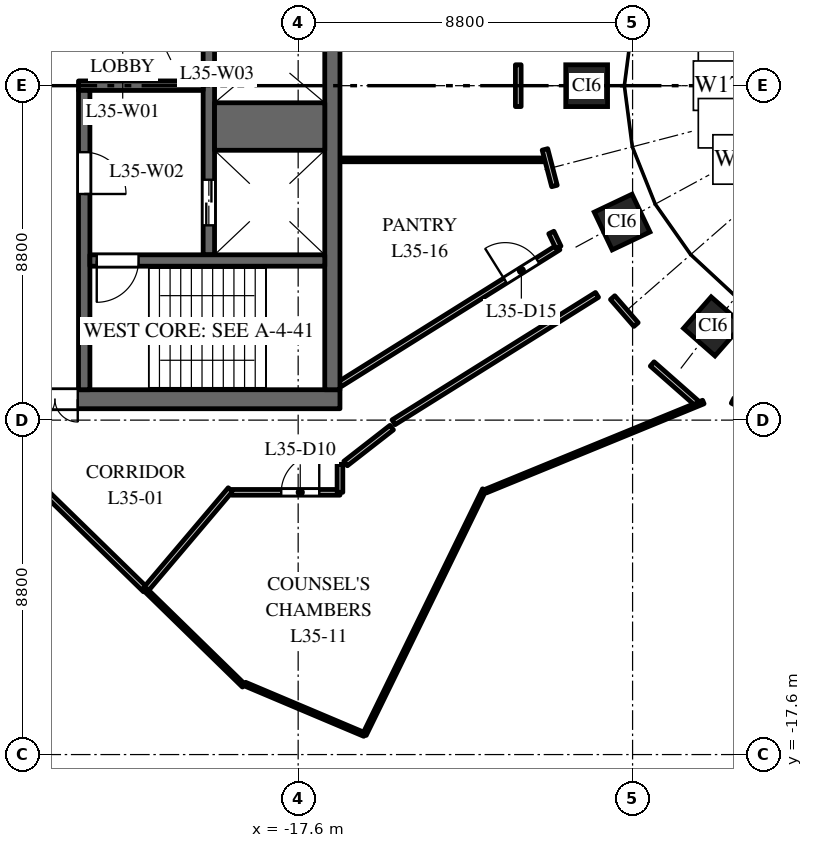
"""IFC4 building model, lengths in metres.
Left out: names, types, materials, properties, quantities, classifications, styles, units other than length and angle.
Written with IfcOpenShell. Run it as: python <this file> out.ifc"""

import sys

from ifc_helpers import new_model, si_unit, direction, frame, frame_2d, origin, origin_2d, place, context, subcontext, project, spatial, rectangle, extrude, element, fill, save


model = new_model("IFC4")
c1 = context("Model", 3, precision=1e-05, world=origin(), true_north=direction((0.0, 1.0)))
c2 = subcontext(c1, "Body", "Model", "MODEL_VIEW")
j1 = project(units=[si_unit("LENGTHUNIT", "METRE"), si_unit("PLANEANGLEUNIT", "RADIAN")], contexts=[c1])
p1 = place(None, origin())
s1 = spatial("IfcSite", under=j1, at=p1, CompositionType="ELEMENT")
p2 = place(p1, origin())
s2 = spatial("IfcBuilding", under=s1, at=p2, CompositionType="ELEMENT")
p3 = place(p2, frame((0.0, 0.0, 154.0)))
s3 = spatial("IfcBuildingStorey", under=s2, at=p3, CompositionType="ELEMENT", Elevation=154.0)
for number, where, z_axis, x_axis in (
    (1, (-10.008, 0.0, 0.0), (0.0, 0.0, 1.0), (0.0, -1.0, 0.0)),
    (2, (-9.076, -3.588, 0.0), (0.0, 0.0, 1.0), (0.429, -0.903, 0.0)),
    (3, (-6.682, -6.334, 0.0), (0.0, 0.0, 1.0), (0.751, -0.66, 0.0)),
):
    element("IfcColumn", number, at=place(p3, frame(where, z_axis=z_axis, x_axis=x_axis)), inside=s3, PredefinedType="COLUMN", context=c2, shape_type="SweptSolid", body=[
        extrude(rectangle(XDim=1.1, YDim=1.1, at=origin_2d()), origin(), (0.0, 0.0, 1.0), 4.0),
    ])
p4 = place(p3, frame((-16.5, -8.25, 0.0), z_axis=(0.0, 0.0, 1.0), x_axis=(-1.0, 0.0, 0.0)))
e4 = element("IfcWall", 4, at=p4, inside=s3, PredefinedType="SHEAR", context=c2, shape_type="SweptSolid", body=[
    extrude(rectangle(XDim=15.0, YDim=0.5, at=frame_2d((7.5, 0.0))), origin(), (0.0, 0.0, 1.0), 3.7),
])
p5 = place(p4, frame((6.9, 0.0, 0.0)))
e5 = element("IfcOpeningElement", 5, at=p5, cuts=e4, PredefinedType="OPENING", context=c2, shape_type="SweptSolid", body=[
    extrude(rectangle(XDim=1.2, YDim=2.1, at=frame_2d((0.6, 1.05))), frame((0.0, 0.26, 0.0), z_axis=(0.0, -1.0, 0.0), x_axis=(1.0, 0.0, 0.0)), (0.0, 0.0, 1.0), 0.52),
])
p6 = place(p4, frame((12.05, 0.0, 0.0)))
e6 = element("IfcOpeningElement", 6, at=p6, cuts=e4, PredefinedType="OPENING", context=c2, shape_type="SweptSolid", body=[
    extrude(rectangle(XDim=0.9, YDim=2.1, at=frame_2d((0.45, 1.05))), frame((0.0, 0.26, 0.0), z_axis=(0.0, -1.0, 0.0), x_axis=(1.0, 0.0, 0.0)), (0.0, 0.0, 1.0), 0.52),
])
p7 = place(p3, frame((-19.95, -4.45, 0.0), z_axis=(0.0, 0.0, 1.0), x_axis=(0.0, 1.0, 0.0)))
e7 = element("IfcWall", 7, at=p7, inside=s3, PredefinedType="SHEAR", context=c2, shape_type="SweptSolid", body=[
    extrude(rectangle(XDim=8.9, YDim=0.3, at=frame_2d((4.45, 0.0))), origin(), (0.0, 0.0, 1.0), 3.7),
])
p8 = place(p7, frame((0.775, 0.0, 0.0)))
e8 = element("IfcOpeningElement", 8, at=p8, cuts=e7, PredefinedType="OPENING", context=c2, shape_type="SweptSolid", body=[
    extrude(rectangle(XDim=1.2, YDim=2.1, at=frame_2d((0.6, 1.05))), frame((0.0, 0.16, 0.0), z_axis=(0.0, -1.0, 0.0), x_axis=(1.0, 0.0, 0.0)), (0.0, 0.0, 1.0), 0.32),
])
p9 = place(p7, frame((7.25, 0.0, 0.0)))
e9 = element("IfcOpeningElement", 9, at=p9, cuts=e7, PredefinedType="OPENING", context=c2, shape_type="SweptSolid", body=[
    extrude(rectangle(XDim=1.1, YDim=2.1, at=frame_2d((0.55, 1.05))), frame((0.0, 0.16, 0.0), z_axis=(0.0, -1.0, 0.0), x_axis=(1.0, 0.0, 0.0)), (0.0, 0.0, 1.0), 0.32),
])
p10 = place(p3, frame((-20.1, 0.0, 0.0), z_axis=(0.0, 0.0, 1.0), x_axis=(-1.0, 0.0, 0.0)))
e10 = element("IfcWall", 10, at=p10, inside=s3, PredefinedType="SHEAR", context=c2, shape_type="SweptSolid", body=[
    extrude(rectangle(XDim=3.28, YDim=0.25, at=frame_2d((1.64, 0.0))), origin(), (0.0, 0.0, 1.0), 3.7),
])
p11 = place(p3, frame((-16.7, -8.0, 0.0), z_axis=(0.0, 0.0, 1.0), x_axis=(0.0, 1.0, 0.0)))
e11 = element("IfcWall", 11, at=p11, inside=s3, PredefinedType="SHEAR", context=c2, shape_type="SweptSolid", body=[
    extrude(rectangle(XDim=16.0, YDim=0.4, at=frame_2d((8.0, 0.0))), origin(), (0.0, 0.0, 1.0), 3.7),
])
p12 = place(p3, frame((-16.9, -1.075, 0.0), z_axis=(0.0, 0.0, 1.0), x_axis=(-1.0, 0.0, 0.0)))
e12 = element("IfcWall", 12, at=p12, inside=s3, PredefinedType="SHEAR", context=c2, shape_type="SweptSolid", body=[
    extrude(rectangle(XDim=2.9, YDim=1.25, at=frame_2d((1.45, 0.0))), origin(), (0.0, 0.0, 1.0), 3.7),
])
p13 = place(p3, frame((-23.23, -8.0, 0.0), z_axis=(0.0, 0.0, 1.0), x_axis=(0.0, 1.0, 0.0)))
e13 = element("IfcWall", 13, at=p13, inside=s3, PredefinedType="SHEAR", context=c2, shape_type="SweptSolid", body=[
    extrude(rectangle(XDim=7.875, YDim=0.3, at=frame_2d((3.938, 0.0))), origin(), (0.0, 0.0, 1.0), 3.7),
])
p14 = place(p13, frame((5.15, 0.0, 0.0)))
e14 = element("IfcOpeningElement", 14, at=p14, cuts=e13, PredefinedType="OPENING", context=c2, shape_type="SweptSolid", body=[
    extrude(rectangle(XDim=1.1, YDim=2.1, at=frame_2d((0.55, 1.05))), frame((0.0, 0.16, 0.0), z_axis=(0.0, -1.0, 0.0), x_axis=(1.0, 0.0, 0.0)), (0.0, 0.0, 1.0), 0.32),
])
p15 = place(p3, frame((-16.9, -4.6, 0.0), z_axis=(0.0, 0.0, 1.0), x_axis=(-1.0, 0.0, 0.0)))
e15 = element("IfcWall", 15, at=p15, inside=s3, PredefinedType="SHEAR", context=c2, shape_type="SweptSolid", body=[
    extrude(rectangle(XDim=6.18, YDim=0.3, at=frame_2d((3.09, 0.0))), origin(), (0.0, 0.0, 1.0), 3.7),
])
p16 = place(p15, frame((4.9, 0.0, 0.0)))
e16 = element("IfcOpeningElement", 16, at=p16, cuts=e15, PredefinedType="OPENING", context=c2, shape_type="SweptSolid", body=[
    extrude(rectangle(XDim=1.1, YDim=2.1, at=frame_2d((0.55, 1.05))), frame((0.0, 0.16, 0.0), z_axis=(0.0, -1.0, 0.0), x_axis=(1.0, 0.0, 0.0)), (0.0, 0.0, 1.0), 0.32),
])
p17 = place(p3, frame((-24.166, -10.778, 0.0), z_axis=(0.0, 0.0, 1.0), x_axis=(0.715930732039, -0.698171316313, 0.0)))
e17 = element("IfcWall", 17, at=p17, inside=s3, PredefinedType="PARTITIONING", context=c2, shape_type="SweptSolid", body=[
    extrude(rectangle(XDim=3.561, YDim=0.15, at=frame_2d((1.78, 0.0))), origin(), (0.0, 0.0, 1.0), 3.7),
])
p18 = place(p3, frame((-21.617, -13.264, 0.0), z_axis=(0.0, 0.0, 1.0), x_axis=(0.646521695402, 0.762895600574, 0.0)))
e18 = element("IfcWall", 18, at=p18, inside=s3, PredefinedType="PARTITIONING", context=c2, shape_type="SweptSolid", body=[
    extrude(rectangle(XDim=3.455, YDim=0.15, at=frame_2d((1.728, 0.0))), origin(), (0.0, 0.0, 1.0), 3.7),
])
p19 = place(p3, frame((-21.617, -13.264, 0.0), z_axis=(0.0, 0.0, 1.0), x_axis=(0.715469649978, -0.698643814802, 0.0)))
e19 = element("IfcWall", 19, at=p19, inside=s3, PredefinedType="PARTITIONING", context=c2, shape_type="SweptSolid", body=[
    extrude(rectangle(XDim=3.613, YDim=0.1, at=frame_2d((1.807, 0.0))), origin(), (0.0, 0.0, 1.0), 2.75),
])
p20 = place(p3, frame((-19.347, -10.7, 0.0), z_axis=(0.0, 0.0, 1.0), x_axis=(1.0, 0.0, 0.0)))
e20 = element("IfcWall", 20, at=p20, inside=s3, PredefinedType="PARTITIONING", context=c2, shape_type="SweptSolid", body=[
    extrude(rectangle(XDim=2.847, YDim=0.15, at=frame_2d((1.423, 0.0))), origin(), (0.0, 0.0, 1.0), 3.7),
])
p21 = place(p20, frame((1.302, 0.0, 0.0)))
e21 = element("IfcOpeningElement", 21, at=p21, cuts=e20, PredefinedType="OPENING", context=c2, shape_type="SweptSolid", body=[
    extrude(rectangle(XDim=1.0, YDim=2.1, at=frame_2d((0.5, 1.05))), frame((0.0, 0.085, 0.0), z_axis=(0.0, -1.0, 0.0), x_axis=(1.0, 0.0, 0.0)), (0.0, 0.0, 1.0), 0.17),
])
p22 = place(p3, frame((-19.003, -15.744, 0.0), z_axis=(0.0, 0.0, 1.0), x_axis=(0.921193815687, -0.389104039995, 0.0)))
e22 = element("IfcWall", 22, at=p22, inside=s3, PredefinedType="PARTITIONING", context=c2, shape_type="SweptSolid", body=[
    extrude(rectangle(XDim=3.418, YDim=0.1, at=frame_2d((1.709, 0.0))), origin(), (0.0, 0.0, 1.0), 3.7),
])
p23 = place(p3, frame((-16.5, -10.7, 0.0), z_axis=(0.0, 0.0, 1.0), x_axis=(0.0, 1.0, 0.0)))
e23 = element("IfcWall", 23, at=p23, inside=s3, PredefinedType="PARTITIONING", context=c2, shape_type="SweptSolid", body=[
    extrude(rectangle(XDim=0.736, YDim=0.15, at=frame_2d((0.368, 0.0))), origin(), (0.0, 0.0, 1.0), 3.7),
])
p24 = place(p3, frame((-16.5, -1.952, 0.0), z_axis=(0.0, 0.0, 1.0), x_axis=(1.0, 0.0, 0.0)))
e24 = element("IfcWall", 24, at=p24, inside=s3, PredefinedType="PARTITIONING", context=c2, shape_type="SweptSolid", body=[
    extrude(rectangle(XDim=5.384, YDim=0.1, at=frame_2d((2.692, 0.0))), origin(), (0.0, 0.0, 1.0), 3.7),
])
p25 = place(p3, frame((-15.854, -17.074, 0.0), z_axis=(0.0, 0.0, 1.0), x_axis=(0.439232714934, 0.898373320024, 0.0)))
e25 = element("IfcWall", 25, at=p25, inside=s3, PredefinedType="PARTITIONING", context=c2, shape_type="SweptSolid", body=[
    extrude(rectangle(XDim=7.174, YDim=0.1, at=frame_2d((3.587, 0.0))), origin(), (0.0, 0.0, 1.0), 3.7),
])
p26 = place(p3, frame((-16.5, -7.851, 0.0), z_axis=(0.0, 0.0, 1.0), x_axis=(0.847690706888, 0.530490777917, 0.0)))
e26 = element("IfcWall", 26, at=p26, inside=s3, PredefinedType="PARTITIONING", context=c2, shape_type="SweptSolid", body=[
    extrude(rectangle(XDim=6.781, YDim=0.15, at=frame_2d((3.39, 0.0))), origin(), (0.0, 0.0, 1.0), 3.7),
])
p27 = place(p26, frame((5.131, 0.0, 0.0)))
e27 = element("IfcOpeningElement", 27, at=p27, cuts=e26, PredefinedType="OPENING", context=c2, shape_type="SweptSolid", body=[
    extrude(rectangle(XDim=1.0, YDim=2.1, at=frame_2d((0.5, 1.05))), frame((0.0, 0.085, 0.0), z_axis=(0.0, -1.0, 0.0), x_axis=(1.0, 0.0, 0.0)), (0.0, 0.0, 1.0), 0.17),
])
p28 = place(p3, frame((-15.089, -8.856, 0.0), z_axis=(0.0, 0.0, 1.0), x_axis=(0.847611500167, 0.53061732424, 0.0)))
e28 = element("IfcWall", 28, at=p28, inside=s3, PredefinedType="PARTITIONING", context=c2, shape_type="SweptSolid", body=[
    extrude(rectangle(XDim=6.315, YDim=0.15, at=frame_2d((3.158, 0.0))), origin(), (0.0, 0.0, 1.0), 3.7),
])
p29 = place(p3, frame((-12.666, -10.669, 0.0), z_axis=(0.0, 0.0, 1.0), x_axis=(0.925451421732, 0.378866290416, 0.0)))
e29 = element("IfcWall", 29, at=p29, inside=s3, PredefinedType="PARTITIONING", context=c2, shape_type="SweptSolid", body=[
    extrude(rectangle(XDim=6.189, YDim=0.1, at=frame_2d((3.095, 0.0))), origin(), (0.0, 0.0, 1.0), 3.7),
])
p30 = place(p3, frame((-11.808, -0.55, 0.0), z_axis=(0.0, 0.0, 1.0), x_axis=(0.0, 1.0, 0.0)))
e30 = element("IfcWall", 30, at=p30, inside=s3, PredefinedType="PARTITIONING", context=c2, shape_type="SweptSolid", body=[
    extrude(rectangle(XDim=1.1, YDim=0.15, at=frame_2d((0.55, 0.0))), origin(), (0.0, 0.0, 1.0), 3.7),
])
p31 = place(p3, frame((-11.106, -1.677, 0.0), z_axis=(0.0, 0.0, 1.0), x_axis=(0.251541813796, -0.967846431988, 0.0)))
e31 = element("IfcWall", 31, at=p31, inside=s3, PredefinedType="PARTITIONING", context=c2, shape_type="SweptSolid", body=[
    extrude(rectangle(XDim=0.994, YDim=0.15, at=frame_2d((0.497, 0.0))), origin(), (0.0, 0.0, 1.0), 3.7),
])
p32 = place(p3, frame((-10.938, -3.863, 0.0), z_axis=(0.0, 0.0, 1.0), x_axis=(0.429758433873, -0.90294390109, 0.0)))
e32 = element("IfcWall", 32, at=p32, inside=s3, PredefinedType="PARTITIONING", context=c2, shape_type="SweptSolid", body=[
    extrude(rectangle(XDim=0.433, YDim=0.15, at=frame_2d((0.216, 0.0))), origin(), (0.0, 0.0, 1.0), 3.7),
])
p33 = place(p3, frame((-9.325, -5.577, 0.0), z_axis=(0.0, 0.0, 1.0), x_axis=(0.656365478363, -0.754443078578, 0.0)))
e33 = element("IfcWall", 33, at=p33, inside=s3, PredefinedType="PARTITIONING", context=c2, shape_type="SweptSolid", body=[
    extrude(rectangle(XDim=0.938, YDim=0.15, at=frame_2d((0.469, 0.0))), origin(), (0.0, 0.0, 1.0), 2.75),
])
p34 = place(p3, frame((-8.284, -7.322, 0.0), z_axis=(0.0, 0.0, 1.0), x_axis=(0.750666784408, -0.660680996235, 0.0)))
e34 = element("IfcWall", 34, at=p34, inside=s3, PredefinedType="PARTITIONING", context=c2, shape_type="SweptSolid", body=[
    extrude(rectangle(XDim=1.555, YDim=0.15, at=frame_2d((0.777, 0.0))), origin(), (0.0, 0.0, 1.0), 3.7),
])
p35 = place(p3, frame((-6.168, -8.287, 0.0), z_axis=(0.0, 0.0, 1.0), x_axis=(0.889307410814, -0.45730988298, 0.0)))
e35 = element("IfcWall", 35, at=p35, inside=s3, PredefinedType="PARTITIONING", context=c2, shape_type="SweptSolid", body=[
    extrude(rectangle(XDim=0.868, YDim=0.15, at=frame_2d((0.434, 0.0))), origin(), (0.0, 0.0, 1.0), 3.7),
])
p36 = place(p3, frame((-15.139, -8.997, 0.0), z_axis=(0.0, 0.0, 1.0), x_axis=(-0.788950226826, -0.614457109643, 0.0)))
e36 = element("IfcWall", 36, at=p36, inside=s3, PredefinedType="PARTITIONING", context=c2, shape_type="SweptSolid", body=[
    extrude(rectangle(XDim=1.538, YDim=0.15, at=frame_2d((0.769, 0.0))), origin(), (0.0, 0.0, 1.0), 3.7),
])
p37 = place(p8, origin())
e37 = element("IfcDoor", 37, at=p37, inside=s3, OperationType="DOUBLE_DOOR_SLIDING", PredefinedType="DOOR", context=c2, shape_type="SweptSolid", body=[
    extrude(rectangle(XDim=1.2, YDim=2.1, at=frame_2d((0.6, 1.05))), frame((0.0, 0.025, 0.0), z_axis=(0.0, -1.0, 0.0), x_axis=(1.0, 0.0, 0.0)), (0.0, 0.0, 1.0), 0.05),
])
fill(e8, e37)
p38 = place(p16, origin())
e38 = element("IfcDoor", 38, at=p38, inside=s3, OperationType="SINGLE_SWING_LEFT", PredefinedType="DOOR", context=c2, shape_type="SweptSolid", body=[
    extrude(rectangle(XDim=1.1, YDim=2.1, at=frame_2d((0.55, 1.05))), frame((0.0, 0.025, 0.0), z_axis=(0.0, -1.0, 0.0), x_axis=(1.0, 0.0, 0.0)), (0.0, 0.0, 1.0), 0.05),
])
fill(e16, e38)
p39 = place(p14, origin())
e39 = element("IfcDoor", 39, at=p39, inside=s3, OperationType="SINGLE_SWING_LEFT", PredefinedType="DOOR", context=c2, shape_type="SweptSolid", body=[
    extrude(rectangle(XDim=1.1, YDim=2.1, at=frame_2d((0.55, 1.05))), frame((0.0, 0.025, 0.0), z_axis=(0.0, -1.0, 0.0), x_axis=(1.0, 0.0, 0.0)), (0.0, 0.0, 1.0), 0.05),
])
fill(e14, e39)
p40 = place(p5, origin())
e40 = element("IfcDoor", 40, at=p40, inside=s3, OperationType="DOUBLE_DOOR_DOUBLE_SWING", PredefinedType="DOOR", context=c2, shape_type="SweptSolid", body=[
    extrude(rectangle(XDim=1.2, YDim=2.1, at=frame_2d((0.6, 1.05))), frame((0.0, 0.025, 0.0), z_axis=(0.0, -1.0, 0.0), x_axis=(1.0, 0.0, 0.0)), (0.0, 0.0, 1.0), 0.05),
])
fill(e5, e40)
p41 = place(p21, origin())
e41 = element("IfcDoor", 41, at=p41, inside=s3, OperationType="SINGLE_SWING_RIGHT", PredefinedType="DOOR", context=c2, shape_type="SweptSolid", body=[
    extrude(rectangle(XDim=1.0, YDim=2.1, at=frame_2d((0.5, 1.05))), frame((0.0, 0.025, 0.0), z_axis=(0.0, -1.0, 0.0), x_axis=(1.0, 0.0, 0.0)), (0.0, 0.0, 1.0), 0.05),
])
fill(e21, e41)
p42 = place(p27, origin())
e42 = element("IfcDoor", 42, at=p42, inside=s3, OperationType="SINGLE_SWING_LEFT", PredefinedType="DOOR", context=c2, shape_type="SweptSolid", body=[
    extrude(rectangle(XDim=1.0, YDim=2.1, at=frame_2d((0.5, 1.05))), frame((0.0, 0.025, 0.0), z_axis=(0.0, -1.0, 0.0), x_axis=(1.0, 0.0, 0.0)), (0.0, 0.0, 1.0), 0.05),
])
fill(e27, e42)
save(model, sys.argv[1])
